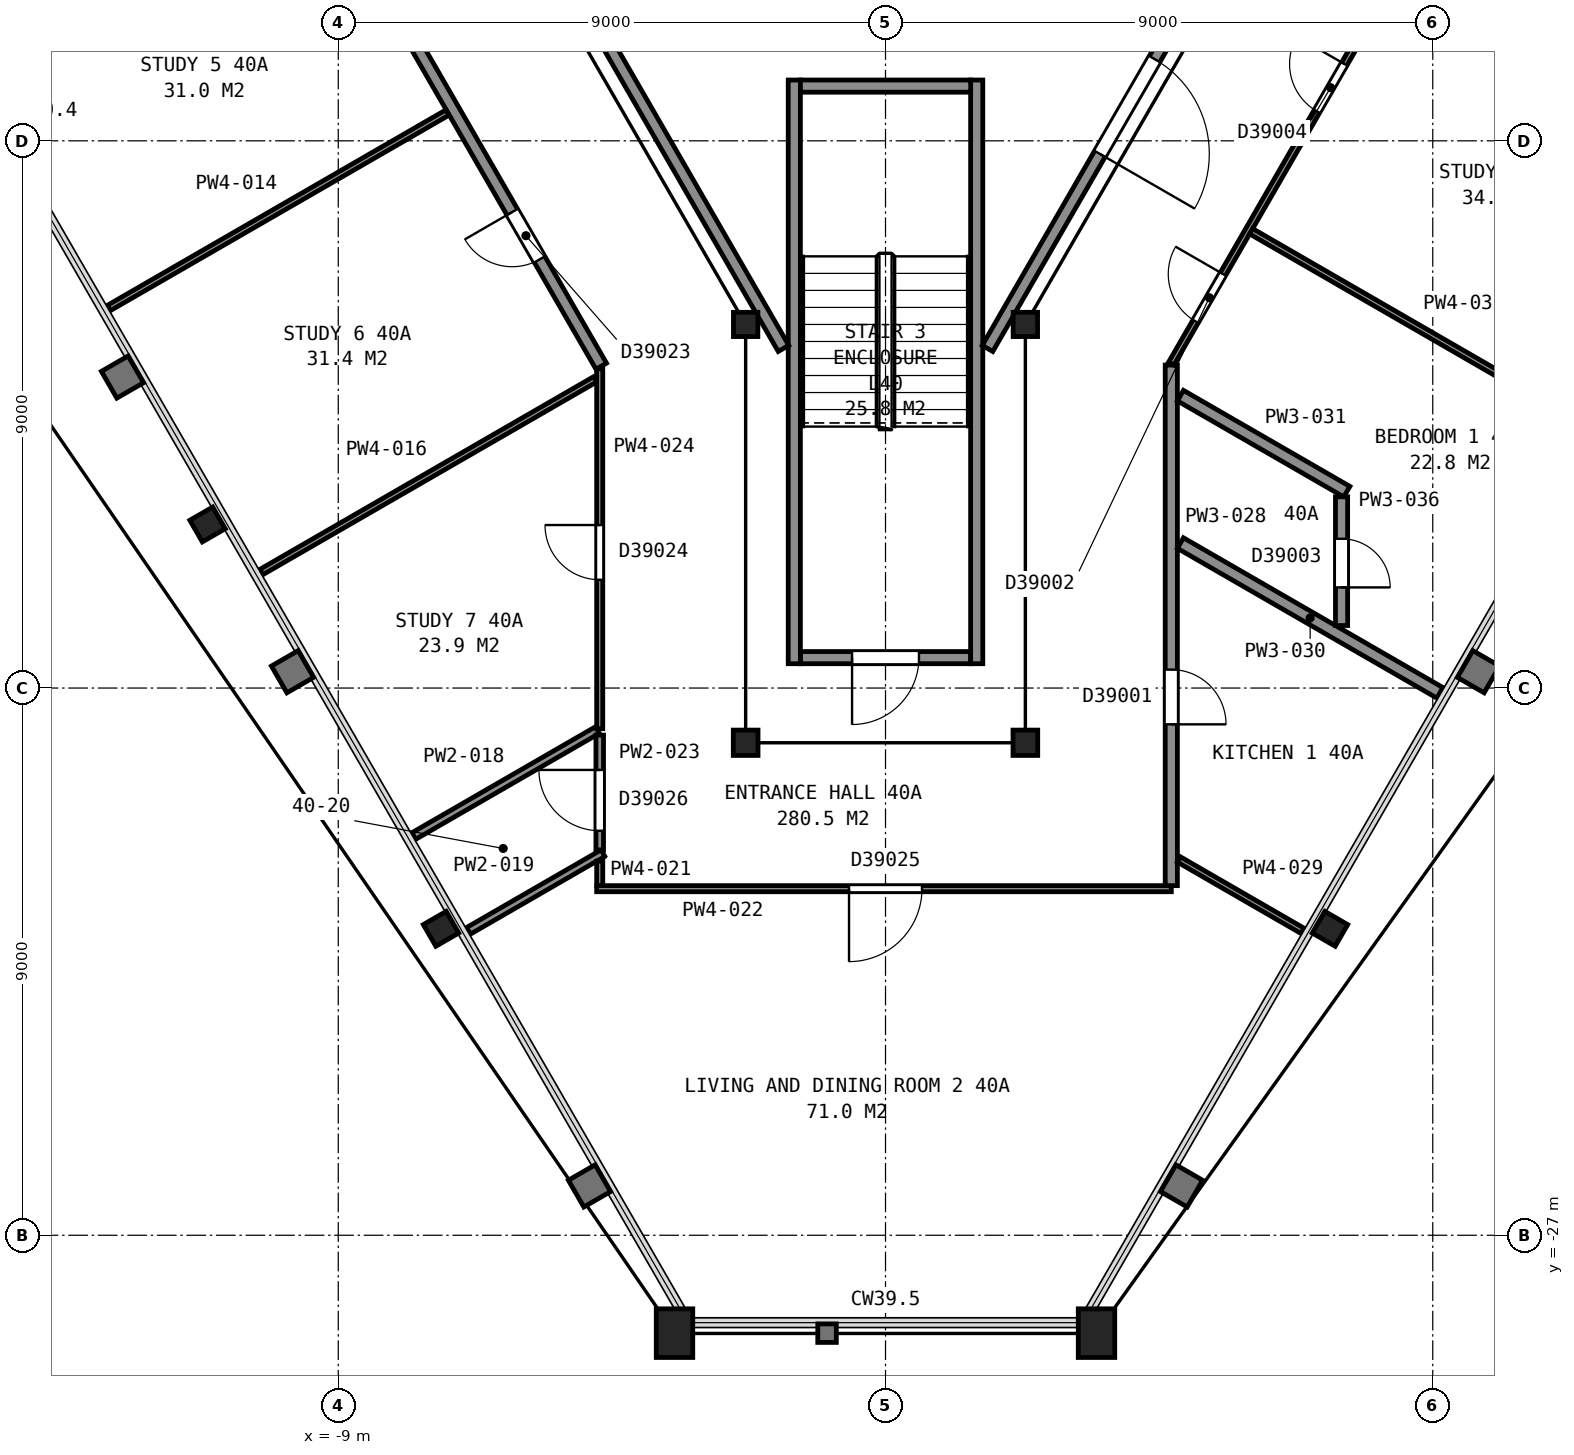
"""IFC4 building model, lengths in metres.
Left out: names, types, materials, properties, quantities, classifications, styles, units other than length and angle.
Written with IfcOpenShell. Run it as: python <this file> out.ifc"""

import sys

from ifc_helpers import new_model, si_unit, direction, frame, frame_2d, origin, origin_2d, place, context, subcontext, project, spatial, rectangle, hollow_rectangle, i_section, extrude, element, fill, save


model = new_model("IFC4")
c1 = context("Model", 3, precision=1e-05, world=origin(), true_north=direction((0.0, 1.0)))
c2 = subcontext(c1, "Body", "Model", "MODEL_VIEW")
j1 = project(units=[si_unit("LENGTHUNIT", "METRE"), si_unit("PLANEANGLEUNIT", "RADIAN")], contexts=[c1])
p1 = place(None, origin())
s1 = spatial("IfcSite", under=j1, at=p1, CompositionType="ELEMENT")
p2 = place(p1, origin())
s2 = spatial("IfcBuilding", under=s1, at=p2, CompositionType="ELEMENT")
p3 = place(p2, frame((0.0, 0.0, 163.6)))
s3 = spatial("IfcBuildingStorey", under=s2, at=p3, CompositionType="ELEMENT", Elevation=163.6)
for number, where, z_axis, x_axis in (
    (1, (-11.15, -15.31, 0.0), (0.0, 0.0, 1.0), (-0.5, 0.866, 0.0)),
    (2, (-7.31, -21.96, 0.0), (0.0, 0.0, 1.0), (-0.5, 0.866, 0.0)),
):
    element("IfcColumn", number, at=place(p3, frame(where, z_axis=z_axis, x_axis=x_axis)), inside=s3, PredefinedType="COLUMN", context=c2, shape_type="SweptSolid", body=[
        extrude(i_section(OverallWidth=0.411, OverallDepth=0.434, WebThickness=0.036, FlangeThickness=0.057, FilletRadius=0.015, at=origin_2d()), origin(), (0.0, 0.0, 1.0), 3.7),
    ])
for number, where, z_axis, x_axis in (
    (3, (-3.47, -28.61, 0.0), (0.0, 0.0, 1.0), (-1.0, 0.0, 0.0)),
    (4, (3.47, -28.61, 0.0), (0.0, 0.0, 1.0), (-1.0, 0.0, 0.0)),
):
    element("IfcColumn", number, at=place(p3, frame(where, z_axis=z_axis, x_axis=x_axis)), inside=s3, PredefinedType="COLUMN", context=c2, shape_type="SweptSolid", body=[
        extrude(hollow_rectangle(XDim=0.6, YDim=0.8, WallThickness=0.05, at=origin_2d()), origin(), (0.0, 0.0, 1.0), 3.7),
    ])
p4 = place(p3, frame((7.31, -21.96, 0.0), z_axis=(0.0, 0.0, 1.0), x_axis=(-0.5, -0.866025403784, 0.0)))
e5 = element("IfcColumn", 5, at=p4, inside=s3, PredefinedType="COLUMN", context=c2, shape_type="SweptSolid", body=[
    extrude(i_section(OverallWidth=0.411, OverallDepth=0.434, WebThickness=0.036, FlangeThickness=0.057, FilletRadius=0.015, at=origin_2d()), origin(), (0.0, 0.0, 1.0), 3.7),
])
p5 = place(p3, frame((-2.3, -12.02, 0.0), z_axis=(0.0, 0.0, 1.0), x_axis=(1.0, 0.0, 0.0)))
e6 = element("IfcColumn", 6, at=p5, inside=s3, PredefinedType="COLUMN", context=c2, shape_type="SweptSolid", body=[
    extrude(i_section(OverallWidth=0.401, OverallDepth=0.399, WebThickness=0.025, FlangeThickness=0.04, FilletRadius=0.015, at=origin_2d()), origin(), (0.0, 0.0, 1.0), 3.7),
])
for number, where, z_axis, x_axis in (
    (7, (-2.3, -18.9, 0.0), (0.0, 0.0, 1.0), (-1.0, 0.0, 0.0)),
    (8, (2.3, -18.9, 0.0), (0.0, 0.0, 1.0), (-1.0, 0.0, 0.0)),
):
    element("IfcColumn", number, at=place(p3, frame(where, z_axis=z_axis, x_axis=x_axis)), inside=s3, PredefinedType="COLUMN", context=c2, shape_type="SweptSolid", body=[
        extrude(i_section(OverallWidth=0.406, OverallDepth=0.417, WebThickness=0.03, FlangeThickness=0.048, FilletRadius=0.015, at=origin_2d()), origin(), (0.0, 0.0, 1.0), 3.7),
    ])
p6 = place(p3, frame((2.3, -12.02, 0.0), z_axis=(0.0, 0.0, 1.0), x_axis=(1.0, 0.0, 0.0)))
e9 = element("IfcColumn", 9, at=p6, inside=s3, PredefinedType="COLUMN", context=c2, shape_type="SweptSolid", body=[
    extrude(i_section(OverallWidth=0.401, OverallDepth=0.399, WebThickness=0.025, FlangeThickness=0.04, FilletRadius=0.015, at=origin_2d()), origin(), (0.0, 0.0, 1.0), 3.7),
])
p7 = place(p3, frame((-1.4, -17.5, 0.0), z_axis=(0.0, 0.0, 1.0), x_axis=(1.0, 0.0, 0.0)))
e10 = element("IfcWall", 10, at=p7, inside=s3, PredefinedType="PARTITIONING", context=c2, shape_type="SweptSolid", body=[
    extrude(rectangle(XDim=2.8, YDim=0.2, at=frame_2d((1.4, 0.0))), origin(), (0.0, 0.0, 1.0), 3.45),
])
p8 = place(p7, frame((0.85, 0.0, 0.0)))
e11 = element("IfcOpeningElement", 11, at=p8, cuts=e10, PredefinedType="OPENING", context=c2, shape_type="SweptSolid", body=[
    extrude(rectangle(XDim=1.1, YDim=2.1, at=frame_2d((0.55, 1.05))), frame((0.0, 0.11, 0.0), z_axis=(0.0, -1.0, 0.0), x_axis=(1.0, 0.0, 0.0)), (0.0, 0.0, 1.0), 0.22),
])
for number, where, z_axis, x_axis in (
    (12, (1.5, -8.0, 0.0), (0.0, 0.0, 1.0), (0.0, -1.0, 0.0)),
    (13, (-1.5, -8.0, 0.0), (0.0, 0.0, 1.0), (0.0, -1.0, 0.0)),
):
    element("IfcWall", number, at=place(p3, frame(where, z_axis=z_axis, x_axis=x_axis)), inside=s3, PredefinedType="PARTITIONING", context=c2, shape_type="SweptSolid", body=[
        extrude(rectangle(XDim=9.6, YDim=0.2, at=frame_2d((4.8, 0.0))), origin(), (0.0, 0.0, 1.0), 3.45),
    ])
p9 = place(p3, frame((-1.4, -8.1, 0.0), z_axis=(0.0, 0.0, 1.0), x_axis=(1.0, 0.0, 0.0)))
e14 = element("IfcWall", 14, at=p9, inside=s3, PredefinedType="PARTITIONING", context=c2, shape_type="SweptSolid", body=[
    extrude(rectangle(XDim=2.8, YDim=0.2, at=frame_2d((1.4, 0.0))), origin(), (0.0, 0.0, 1.0), 3.45),
])
p10 = place(p3, frame((-4.655, -7.257, 0.0), z_axis=(0.0, 0.0, 1.0), x_axis=(0.499966124405, -0.866044960985, 0.0)))
e15 = element("IfcWall", 15, at=p10, inside=s3, PredefinedType="PARTITIONING", context=c2, shape_type="SweptSolid", body=[
    extrude(rectangle(XDim=5.956, YDim=0.2, at=frame_2d((2.978, 0.0))), origin(), (0.0, 0.0, 1.0), 3.45),
])
p11 = place(p3, frame((1.677, -12.415, 0.0), z_axis=(0.0, 0.0, 1.0), x_axis=(0.500054337157, 0.865994029939, 0.0)))
e16 = element("IfcWall", 16, at=p11, inside=s3, PredefinedType="PARTITIONING", context=c2, shape_type="SweptSolid", body=[
    extrude(rectangle(XDim=6.177, YDim=0.2, at=frame_2d((3.088, 0.0))), origin(), (0.0, 0.0, 1.0), 3.45),
])
p12 = place(p11, frame((3.695, 0.0, 0.0)))
e17 = element("IfcOpeningElement", 17, at=p12, cuts=e16, PredefinedType="OPENING", context=c2, shape_type="SweptSolid", body=[
    extrude(rectangle(XDim=1.8, YDim=2.1, at=frame_2d((0.9, 1.05))), frame((0.0, 0.11, 0.0), z_axis=(0.0, -1.0, 0.0), x_axis=(1.0, 0.0, 0.0)), (0.0, 0.0, 1.0), 0.22),
])
p13 = place(p3, frame((-4.675, -12.706, 0.0), z_axis=(0.0, 0.0, 1.0), x_axis=(-0.499972470324, 0.866041297467, 0.0)))
e18 = element("IfcWall", 18, at=p13, inside=s3, PredefinedType="PARTITIONING", context=c2, shape_type="SweptSolid", body=[
    extrude(rectangle(XDim=17.385, YDim=0.2, at=frame_2d((8.692, 0.0))), origin(), (0.0, 0.0, 1.0), 2.713),
])
p14 = place(p13, frame((15.435, 0.0, 0.0)))
e19 = element("IfcOpeningElement", 19, at=p14, cuts=e18, PredefinedType="OPENING", context=c2, shape_type="SweptSolid", body=[
    extrude(rectangle(XDim=0.9, YDim=2.1, at=frame_2d((0.45, 1.05))), frame((0.0, 0.11, 0.0), z_axis=(0.0, -1.0, 0.0), x_axis=(1.0, 0.0, 0.0)), (0.0, 0.0, 1.0), 0.22),
])
p15 = place(p13, frame((12.835, 0.0, 0.0)))
e20 = element("IfcOpeningElement", 20, at=p15, cuts=e18, PredefinedType="OPENING", context=c2, shape_type="SweptSolid", body=[
    extrude(rectangle(XDim=0.9, YDim=2.1, at=frame_2d((0.45, 1.05))), frame((0.0, 0.11, 0.0), z_axis=(0.0, -1.0, 0.0), x_axis=(1.0, 0.0, 0.0)), (0.0, 0.0, 1.0), 0.22),
])
p16 = place(p13, frame((6.941, 0.0, 0.0)))
e21 = element("IfcOpeningElement", 21, at=p16, cuts=e18, PredefinedType="OPENING", context=c2, shape_type="SweptSolid", body=[
    extrude(rectangle(XDim=0.9, YDim=2.1, at=frame_2d((0.45, 1.05))), frame((0.0, 0.11, 0.0), z_axis=(0.0, -1.0, 0.0), x_axis=(1.0, 0.0, 0.0)), (0.0, 0.0, 1.0), 0.22),
])
p17 = place(p13, frame((2.028, 0.0, 0.0)))
e22 = element("IfcOpeningElement", 22, at=p17, cuts=e18, PredefinedType="OPENING", context=c2, shape_type="SweptSolid", body=[
    extrude(rectangle(XDim=0.9, YDim=2.1, at=frame_2d((0.45, 1.05))), frame((0.0, 0.11, 0.0), z_axis=(0.0, -1.0, 0.0), x_axis=(1.0, 0.0, 0.0)), (0.0, 0.0, 1.0), 0.22),
])
p18 = place(p3, frame((-12.772, -11.749, 0.0), z_axis=(0.0, 0.0, 1.0), x_axis=(0.866026229868, 0.499998569178, 0.0)))
e23 = element("IfcWall", 23, at=p18, inside=s3, PredefinedType="PARTITIONING", context=c2, shape_type="SweptSolid", body=[
    extrude(rectangle(XDim=6.429, YDim=0.1, at=frame_2d((3.215, 0.0))), origin(), (0.0, 0.0, 1.0), 2.713),
])
p19 = place(p3, frame((-10.264, -16.092, 0.0), z_axis=(0.0, 0.0, 1.0), x_axis=(0.86602074738, 0.500008065043, 0.0)))
e24 = element("IfcWall", 24, at=p19, inside=s3, PredefinedType="PARTITIONING", context=c2, shape_type="SweptSolid", body=[
    extrude(rectangle(XDim=6.339, YDim=0.1, at=frame_2d((3.169, 0.0))), origin(), (0.0, 0.0, 1.0), 2.713),
])
p20 = place(p3, frame((-7.758, -20.434, 0.0), z_axis=(0.0, 0.0, 1.0), x_axis=(0.866090019653, 0.499888065328, 0.0)))
e25 = element("IfcWall", 25, at=p20, inside=s3, PredefinedType="PARTITIONING", context=c2, shape_type="SweptSolid", body=[
    extrude(rectangle(XDim=3.488, YDim=0.125, at=frame_2d((1.744, 0.0))), origin(), (0.0, 0.0, 1.0), 2.713),
])
p21 = place(p3, frame((-6.858, -21.993, 0.0), z_axis=(0.0, 0.0, 1.0), x_axis=(0.865992952931, 0.500056202316, 0.0)))
e26 = element("IfcWall", 26, at=p21, inside=s3, PredefinedType="PARTITIONING", context=c2, shape_type="SweptSolid", body=[
    extrude(rectangle(XDim=2.554, YDim=0.125, at=frame_2d((1.277, 0.0))), origin(), (0.0, 0.0, 1.0), 2.713),
])
p22 = place(p3, frame((-4.7, -21.25, 0.0), z_axis=(0.0, 0.0, 1.0), x_axis=(0.0, 1.0, 0.0)))
e27 = element("IfcWall", 27, at=p22, inside=s3, PredefinedType="PARTITIONING", context=c2, shape_type="SweptSolid", body=[
    extrude(rectangle(XDim=0.403, YDim=0.1, at=frame_2d((0.202, 0.0))), origin(), (0.0, 0.0, 1.0), 2.713),
])
p23 = place(p3, frame((4.7, -21.3, 0.0), z_axis=(0.0, 0.0, 1.0), x_axis=(-1.0, 0.0, 0.0)))
e28 = element("IfcWall", 28, at=p23, inside=s3, PredefinedType="PARTITIONING", context=c2, shape_type="SweptSolid", body=[
    extrude(rectangle(XDim=9.45, YDim=0.1, at=frame_2d((4.725, 0.0))), origin(), (0.0, 0.0, 1.0), 2.713),
])
p24 = place(p23, frame((4.1, 0.0, 0.0)))
e29 = element("IfcOpeningElement", 29, at=p24, cuts=e28, PredefinedType="OPENING", context=c2, shape_type="SweptSolid", body=[
    extrude(rectangle(XDim=1.2, YDim=2.1, at=frame_2d((0.6, 1.05))), frame((0.0, 0.06, 0.0), z_axis=(0.0, -1.0, 0.0), x_axis=(1.0, 0.0, 0.0)), (0.0, 0.0, 1.0), 0.12),
])
p25 = place(p3, frame((-4.7, -18.774, 0.0), z_axis=(0.0, 0.0, 1.0), x_axis=(0.0, -1.0, 0.0)))
e30 = element("IfcWall", 30, at=p25, inside=s3, PredefinedType="PARTITIONING", context=c2, shape_type="SweptSolid", body=[
    extrude(rectangle(XDim=1.888, YDim=0.125, at=frame_2d((0.944, 0.0))), origin(), (0.0, 0.0, 1.0), 2.713),
])
p26 = place(p25, frame((0.573, 0.0, 0.0)))
e31 = element("IfcOpeningElement", 31, at=p26, cuts=e30, PredefinedType="OPENING", context=c2, shape_type="SweptSolid", body=[
    extrude(rectangle(XDim=1.0, YDim=2.1, at=frame_2d((0.5, 1.05))), frame((0.0, 0.073, 0.0), z_axis=(0.0, -1.0, 0.0), x_axis=(1.0, 0.0, 0.0)), (0.0, 0.0, 1.0), 0.145),
])
p27 = place(p3, frame((-4.7, -18.669, 0.0), z_axis=(0.0, 0.0, 1.0), x_axis=(0.0, 1.0, 0.0)))
e32 = element("IfcWall", 32, at=p27, inside=s3, PredefinedType="PARTITIONING", context=c2, shape_type="SweptSolid", body=[
    extrude(rectangle(XDim=5.921, YDim=0.1, at=frame_2d((2.96, 0.0))), origin(), (0.0, 0.0, 1.0), 2.713),
])
p28 = place(p27, frame((2.45, 0.0, 0.0)))
e33 = element("IfcOpeningElement", 33, at=p28, cuts=e32, PredefinedType="OPENING", context=c2, shape_type="SweptSolid", body=[
    extrude(rectangle(XDim=0.9, YDim=2.1, at=frame_2d((0.45, 1.05))), frame((0.0, 0.06, 0.0), z_axis=(0.0, -1.0, 0.0), x_axis=(1.0, 0.0, 0.0)), (0.0, 0.0, 1.0), 0.12),
])
p29 = place(p3, frame((4.7, -12.688, 0.0), z_axis=(0.0, 0.0, 1.0), x_axis=(0.0, -1.0, 0.0)))
e34 = element("IfcWall", 34, at=p29, inside=s3, PredefinedType="PARTITIONING", context=c2, shape_type="SweptSolid", body=[
    extrude(rectangle(XDim=8.562, YDim=0.2, at=frame_2d((4.281, 0.0))), origin(), (0.0, 0.0, 1.0), 2.713),
])
p30 = place(p29, frame((5.009, 0.0, 0.0)))
e35 = element("IfcOpeningElement", 35, at=p30, cuts=e34, PredefinedType="OPENING", context=c2, shape_type="SweptSolid", body=[
    extrude(rectangle(XDim=0.9, YDim=2.1, at=frame_2d((0.45, 1.05))), frame((0.0, 0.11, 0.0), z_axis=(0.0, -1.0, 0.0), x_axis=(1.0, 0.0, 0.0)), (0.0, 0.0, 1.0), 0.22),
])
p31 = place(p3, frame((4.825, -20.819, 0.0), z_axis=(0.0, 0.0, 1.0), x_axis=(0.865981189106, -0.500076574252, 0.0)))
e36 = element("IfcWall", 36, at=p31, inside=s3, PredefinedType="PARTITIONING", context=c2, shape_type="SweptSolid", body=[
    extrude(rectangle(XDim=2.347, YDim=0.1, at=frame_2d((1.174, 0.0))), origin(), (0.0, 0.0, 1.0), 2.713),
])
p32 = place(p3, frame((4.85, -15.615, 0.0), z_axis=(0.0, 0.0, 1.0), x_axis=(0.866057699548, -0.499944057923, 0.0)))
e37 = element("IfcWall", 37, at=p32, inside=s3, PredefinedType="PARTITIONING", context=c2, shape_type="SweptSolid", body=[
    extrude(rectangle(XDim=4.927, YDim=0.2, at=frame_2d((2.464, 0.0))), origin(), (0.0, 0.0, 1.0), 2.713),
])
p33 = place(p3, frame((4.85, -13.191, 0.0), z_axis=(0.0, 0.0, 1.0), x_axis=(0.866109679077, -0.499854002494, 0.0)))
e38 = element("IfcWall", 38, at=p33, inside=s3, PredefinedType="PARTITIONING", context=c2, shape_type="SweptSolid", body=[
    extrude(rectangle(XDim=3.16, YDim=0.2, at=frame_2d((1.58, 0.0))), origin(), (0.0, 0.0, 1.0), 2.713),
])
p34 = place(p3, frame((13.342, 2.306, 0.0), z_axis=(0.0, 0.0, 1.0), x_axis=(-0.49997635812, -0.866039053, 0.0)))
e39 = element("IfcWall", 39, at=p34, inside=s3, PredefinedType="PARTITIONING", context=c2, shape_type="SweptSolid", body=[
    extrude(rectangle(XDim=17.285, YDim=0.1, at=frame_2d((8.643, 0.0))), origin(), (0.0, 0.0, 1.0), 2.713),
])
p35 = place(p34, frame((15.585, 0.0, 0.0)))
e40 = element("IfcOpeningElement", 40, at=p35, cuts=e39, PredefinedType="OPENING", context=c2, shape_type="SweptSolid", body=[
    extrude(rectangle(XDim=0.9, YDim=2.1, at=frame_2d((0.45, 1.05))), frame((0.0, 0.06, 0.0), z_axis=(0.0, -1.0, 0.0), x_axis=(1.0, 0.0, 0.0)), (0.0, 0.0, 1.0), 0.12),
])
p36 = place(p34, frame((11.595, 0.0, 0.0)))
e41 = element("IfcOpeningElement", 41, at=p36, cuts=e39, PredefinedType="OPENING", context=c2, shape_type="SweptSolid", body=[
    extrude(rectangle(XDim=0.9, YDim=2.1, at=frame_2d((0.45, 1.05))), frame((0.0, 0.06, 0.0), z_axis=(0.0, -1.0, 0.0), x_axis=(1.0, 0.0, 0.0)), (0.0, 0.0, 1.0), 0.12),
])
p37 = place(p34, frame((6.171, 0.0, 0.0)))
e42 = element("IfcOpeningElement", 42, at=p37, cuts=e39, PredefinedType="OPENING", context=c2, shape_type="SweptSolid", body=[
    extrude(rectangle(XDim=0.9, YDim=2.1, at=frame_2d((0.45, 1.05))), frame((0.0, 0.06, 0.0), z_axis=(0.0, -1.0, 0.0), x_axis=(1.0, 0.0, 0.0)), (0.0, 0.0, 1.0), 0.12),
])
p38 = place(p3, frame((6.013, -10.488, 0.0), z_axis=(0.0, 0.0, 1.0), x_axis=(0.86599118531, -0.500059263454, 0.0)))
e43 = element("IfcWall", 43, at=p38, inside=s3, PredefinedType="PARTITIONING", context=c2, shape_type="SweptSolid", body=[
    extrude(rectangle(XDim=6.484, YDim=0.1, at=frame_2d((3.242, 0.0))), origin(), (0.0, 0.0, 1.0), 2.713),
])
p39 = place(p3, frame((7.5, -16.972, 0.0), z_axis=(0.0, 0.0, 1.0), x_axis=(0.0, 1.0, 0.0)))
e44 = element("IfcWall", 44, at=p39, inside=s3, PredefinedType="PARTITIONING", context=c2, shape_type="SweptSolid", body=[
    extrude(rectangle(XDim=2.117, YDim=0.2, at=frame_2d((1.059, 0.0))), origin(), (0.0, 0.0, 1.0), 2.713),
])
p40 = place(p39, frame((0.627, 0.0, 0.0)))
e45 = element("IfcOpeningElement", 45, at=p40, cuts=e44, PredefinedType="OPENING", context=c2, shape_type="SweptSolid", body=[
    extrude(rectangle(XDim=0.8, YDim=2.1, at=frame_2d((0.4, 1.05))), frame((0.0, 0.11, 0.0), z_axis=(0.0, -1.0, 0.0), x_axis=(1.0, 0.0, 0.0)), (0.0, 0.0, 1.0), 0.22),
])
p41 = place(p3, frame((8.725, -5.791, 0.0), z_axis=(0.0, 0.0, 1.0), x_axis=(0.865998075994, -0.500047330135, 0.0)))
e46 = element("IfcWall", 46, at=p41, inside=s3, PredefinedType="PARTITIONING", context=c2, shape_type="SweptSolid", body=[
    extrude(rectangle(XDim=6.483, YDim=0.1, at=frame_2d((3.242, 0.0))), origin(), (0.0, 0.0, 1.0), 2.713),
])
p42 = place(p8, origin())
e47 = element("IfcDoor", 47, at=p42, inside=s3, OperationType="SINGLE_SWING_LEFT", PredefinedType="DOOR", context=c2, shape_type="SweptSolid", body=[
    extrude(rectangle(XDim=1.1, YDim=2.1, at=frame_2d((0.55, 1.05))), frame((0.0, 0.025, 0.0), z_axis=(0.0, -1.0, 0.0), x_axis=(1.0, 0.0, 0.0)), (0.0, 0.0, 1.0), 0.05),
])
fill(e11, e47)
p43 = place(p12, origin())
e48 = element("IfcDoor", 48, at=p43, inside=s3, OperationType="DOUBLE_DOOR_SINGLE_SWING", PredefinedType="DOOR", context=c2, shape_type="SweptSolid", body=[
    extrude(rectangle(XDim=1.8, YDim=2.1, at=frame_2d((0.9, 1.05))), frame((0.0, 0.025, 0.0), z_axis=(0.0, -1.0, 0.0), x_axis=(1.0, 0.0, 0.0)), (0.0, 0.0, 1.0), 0.05),
])
fill(e17, e48)
p44 = place(p17, origin())
e49 = element("IfcDoor", 49, at=p44, inside=s3, OperationType="SINGLE_SWING_RIGHT", PredefinedType="DOOR", context=c2, shape_type="SweptSolid", body=[
    extrude(rectangle(XDim=0.9, YDim=2.1, at=frame_2d((0.45, 1.05))), frame((0.0, 0.025, 0.0), z_axis=(0.0, -1.0, 0.0), x_axis=(1.0, 0.0, 0.0)), (0.0, 0.0, 1.0), 0.05),
])
fill(e22, e49)
p45 = place(p24, origin())
e50 = element("IfcDoor", 50, at=p45, inside=s3, OperationType="SINGLE_SWING_RIGHT", PredefinedType="DOOR", context=c2, shape_type="SweptSolid", body=[
    extrude(rectangle(XDim=1.2, YDim=2.1, at=frame_2d((0.6, 1.05))), frame((0.0, 0.025, 0.0), z_axis=(0.0, -1.0, 0.0), x_axis=(1.0, 0.0, 0.0)), (0.0, 0.0, 1.0), 0.05),
])
fill(e29, e50)
p46 = place(p26, origin())
e51 = element("IfcDoor", 51, at=p46, inside=s3, OperationType="SINGLE_SWING_LEFT", PredefinedType="DOOR", context=c2, shape_type="SweptSolid", body=[
    extrude(rectangle(XDim=1.0, YDim=2.1, at=frame_2d((0.5, 1.05))), frame((0.0, 0.025, 0.0), z_axis=(0.0, -1.0, 0.0), x_axis=(1.0, 0.0, 0.0)), (0.0, 0.0, 1.0), 0.05),
])
fill(e31, e51)
p47 = place(p28, origin())
e52 = element("IfcDoor", 52, at=p47, inside=s3, OperationType="SINGLE_SWING_RIGHT", PredefinedType="DOOR", context=c2, shape_type="SweptSolid", body=[
    extrude(rectangle(XDim=0.9, YDim=2.1, at=frame_2d((0.45, 1.05))), frame((0.0, 0.025, 0.0), z_axis=(0.0, -1.0, 0.0), x_axis=(1.0, 0.0, 0.0)), (0.0, 0.0, 1.0), 0.05),
])
fill(e33, e52)
p48 = place(p30, origin())
e53 = element("IfcDoor", 53, at=p48, inside=s3, OperationType="SINGLE_SWING_RIGHT", PredefinedType="DOOR", context=c2, shape_type="SweptSolid", body=[
    extrude(rectangle(XDim=0.9, YDim=2.1, at=frame_2d((0.45, 1.05))), frame((0.0, 0.025, 0.0), z_axis=(0.0, -1.0, 0.0), x_axis=(1.0, 0.0, 0.0)), (0.0, 0.0, 1.0), 0.05),
])
fill(e35, e53)
p49 = place(p35, origin())
e54 = element("IfcDoor", 54, at=p49, inside=s3, OperationType="SINGLE_SWING_LEFT", PredefinedType="DOOR", context=c2, shape_type="SweptSolid", body=[
    extrude(rectangle(XDim=0.9, YDim=2.1, at=frame_2d((0.45, 1.05))), frame((0.0, 0.025, 0.0), z_axis=(0.0, -1.0, 0.0), x_axis=(1.0, 0.0, 0.0)), (0.0, 0.0, 1.0), 0.05),
])
fill(e40, e54)
p50 = place(p36, origin())
e55 = element("IfcDoor", 55, at=p50, inside=s3, OperationType="SINGLE_SWING_LEFT", PredefinedType="DOOR", context=c2, shape_type="SweptSolid", body=[
    extrude(rectangle(XDim=0.9, YDim=2.1, at=frame_2d((0.45, 1.05))), frame((0.0, 0.025, 0.0), z_axis=(0.0, -1.0, 0.0), x_axis=(1.0, 0.0, 0.0)), (0.0, 0.0, 1.0), 0.05),
])
fill(e41, e55)
p51 = place(p40, origin())
e56 = element("IfcDoor", 56, at=p51, inside=s3, OperationType="SINGLE_SWING_LEFT", PredefinedType="DOOR", context=c2, shape_type="SweptSolid", body=[
    extrude(rectangle(XDim=0.8, YDim=2.1, at=frame_2d((0.4, 1.05))), frame((0.0, 0.025, 0.0), z_axis=(0.0, -1.0, 0.0), x_axis=(1.0, 0.0, 0.0)), (0.0, 0.0, 1.0), 0.05),
])
fill(e45, e56)
save(model, sys.argv[1])
